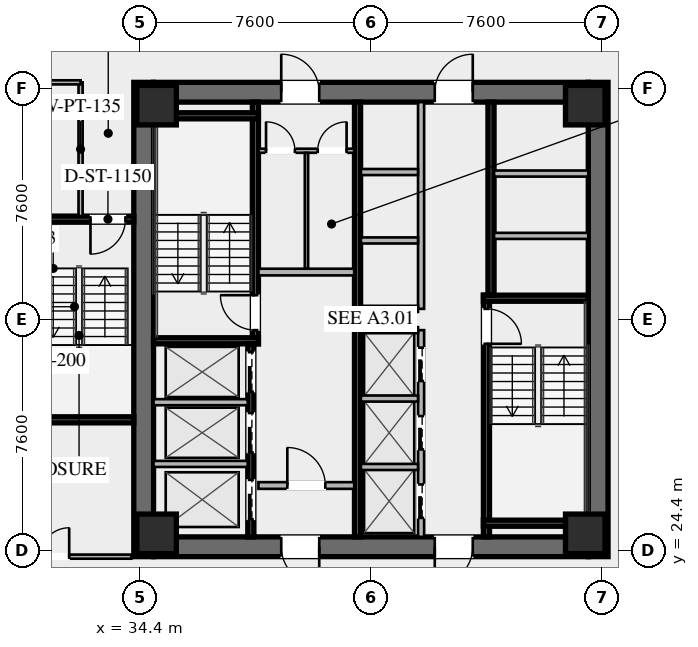
"""IFC4 building model, lengths in metres.
Left out: names, types, materials, properties, quantities, classifications, styles, units other than length and angle.
Written with IfcOpenShell. Run it as: python <this file> out.ifc"""

import sys

from ifc_helpers import new_model, si_unit, direction, frame, frame_2d, origin, origin_2d, place, context, subcontext, project, spatial, rectangle, hollow_rectangle, extrude, element, fill, save


model = new_model("IFC4")
c1 = context("Model", 3, precision=1e-05, world=origin(), true_north=direction((0.0, 1.0)))
c2 = subcontext(c1, "Body", "Model", "MODEL_VIEW")
j1 = project(units=[si_unit("LENGTHUNIT", "METRE"), si_unit("PLANEANGLEUNIT", "RADIAN")], contexts=[c1])
p1 = place(None, origin())
s1 = spatial("IfcSite", under=j1, at=p1, CompositionType="ELEMENT")
p2 = place(p1, origin())
s2 = spatial("IfcBuilding", under=s1, at=p2, CompositionType="ELEMENT")
p3 = place(p2, frame((0.0, 0.0, 24.6)))
s3 = spatial("IfcBuildingStorey", under=s2, at=p3, CompositionType="ELEMENT", Elevation=24.6)
for number, where, z_axis, x_axis in (
    (1, (34.525, 24.2, 0.0), (0.0, 0.0, 1.0), (0.0, 1.0, 0.0)),
    (2, (49.475, 39.8, 0.0), (0.0, 0.0, 1.0), (0.0, -1.0, 0.0)),
):
    element("IfcWall", number, at=place(p3, frame(where, z_axis=z_axis, x_axis=x_axis)), inside=s3, PredefinedType="SHEAR", context=c2, shape_type="SweptSolid", body=[
        extrude(rectangle(XDim=15.6, YDim=0.65, at=frame_2d((7.8, 0.0))), origin(), (0.0, 0.0, 1.0), 3.55),
    ])
p4 = place(p3, frame((49.15, 24.525, 0.0), z_axis=(0.0, 0.0, 1.0), x_axis=(-1.0, 0.0, 0.0)))
e3 = element("IfcWall", 3, at=p4, inside=s3, PredefinedType="SHEAR", context=c2, shape_type="SweptSolid", body=[
    extrude(rectangle(XDim=14.3, YDim=0.65, at=frame_2d((7.15, 0.0))), origin(), (0.0, 0.0, 1.0), 3.55),
])
p5 = place(p4, frame((8.85, 0.0, 0.0)))
e4 = element("IfcOpeningElement", 4, at=p5, cuts=e3, PredefinedType="OPENING", context=c2, shape_type="SweptSolid", body=[
    extrude(rectangle(XDim=1.25, YDim=2.25, at=frame_2d((0.625, 1.125))), frame((0.0, 0.335, 0.0), z_axis=(0.0, -1.0, 0.0), x_axis=(1.0, 0.0, 0.0)), (0.0, 0.0, 1.0), 0.67),
])
p6 = place(p4, frame((3.8, 0.0, 0.0)))
e5 = element("IfcOpeningElement", 5, at=p6, cuts=e3, PredefinedType="OPENING", context=c2, shape_type="SweptSolid", body=[
    extrude(rectangle(XDim=1.25, YDim=2.25, at=frame_2d((0.625, 1.125))), frame((0.0, 0.335, 0.0), z_axis=(0.0, -1.0, 0.0), x_axis=(1.0, 0.0, 0.0)), (0.0, 0.0, 1.0), 0.67),
])
p7 = place(p3, frame((34.85, 39.475, 0.0), z_axis=(0.0, 0.0, 1.0), x_axis=(1.0, 0.0, 0.0)))
e6 = element("IfcWall", 6, at=p7, inside=s3, PredefinedType="SHEAR", context=c2, shape_type="SweptSolid", body=[
    extrude(rectangle(XDim=14.3, YDim=0.65, at=frame_2d((7.15, 0.0))), origin(), (0.0, 0.0, 1.0), 3.55),
])
p8 = place(p7, frame((4.2, 0.0, 0.0)))
e7 = element("IfcOpeningElement", 7, at=p8, cuts=e6, PredefinedType="OPENING", context=c2, shape_type="SweptSolid", body=[
    extrude(rectangle(XDim=1.25, YDim=2.25, at=frame_2d((0.625, 1.125))), frame((0.0, 0.335, 0.0), z_axis=(0.0, -1.0, 0.0), x_axis=(1.0, 0.0, 0.0)), (0.0, 0.0, 1.0), 0.67),
])
p9 = place(p7, frame((9.25, 0.0, 0.0)))
e8 = element("IfcOpeningElement", 8, at=p9, cuts=e6, PredefinedType="OPENING", context=c2, shape_type="SweptSolid", body=[
    extrude(rectangle(XDim=1.25, YDim=2.25, at=frame_2d((0.625, 1.125))), frame((0.0, 0.335, 0.0), z_axis=(0.0, -1.0, 0.0), x_axis=(1.0, 0.0, 0.0)), (0.0, 0.0, 1.0), 0.67),
])
for number, where, z_axis, x_axis in (
    (9, (34.95, 24.95, 0.0), (0.0, 0.0, 1.0), (1.0, 0.0, 0.0)),
    (10, (49.05, 24.95, 0.0), (0.0, 0.0, 1.0), (1.0, 0.0, 0.0)),
    (11, (49.05, 39.05, 0.0), (0.0, 0.0, 1.0), (1.0, 0.0, 0.0)),
    (12, (34.95, 39.05, 0.0), (0.0, 0.0, 1.0), (1.0, 0.0, 0.0)),
):
    element("IfcColumn", number, at=place(p3, frame(where, z_axis=z_axis, x_axis=x_axis)), inside=s3, PredefinedType="COLUMN", context=c2, shape_type="SweptSolid", body=[
        extrude(hollow_rectangle(XDim=1.3, YDim=1.3, WallThickness=0.05, at=origin_2d()), origin(), (0.0, 0.0, 1.0), 3.35),
    ])
p10 = place(p3, frame((38.2, 31.2, 0.0), z_axis=(0.0, 0.0, 1.0), x_axis=(0.0, 1.0, 0.0)))
e13 = element("IfcWall", 13, at=p10, inside=s3, PredefinedType="SHEAR", context=c2, shape_type="SweptSolid", body=[
    extrude(rectangle(XDim=7.95, YDim=0.2, at=frame_2d((3.975, 0.0))), origin(), (0.0, 0.0, 1.0), 3.35),
])
p11 = place(p10, frame((0.45, 0.0, 0.0)))
e14 = element("IfcOpeningElement", 14, at=p11, cuts=e13, PredefinedType="OPENING", context=c2, shape_type="SweptSolid", body=[
    extrude(rectangle(XDim=1.15, YDim=2.2, at=frame_2d((0.575, 1.1))), frame((0.0, 0.11, 0.0), z_axis=(0.0, -1.0, 0.0), x_axis=(1.0, 0.0, 0.0)), (0.0, 0.0, 1.0), 0.22),
])
for number, where, z_axis, x_axis in (
    (15, (34.85, 31.3, 0.0), (0.0, 0.0, 1.0), (1.0, 0.0, 0.0)),
    (16, (34.85, 38.7, 0.0), (0.0, 0.0, 1.0), (1.0, 0.0, 0.0)),
):
    element("IfcWall", number, at=place(p3, frame(where, z_axis=z_axis, x_axis=x_axis)), inside=s3, PredefinedType="SHEAR", context=c2, shape_type="SweptSolid", body=[
        extrude(rectangle(XDim=3.45, YDim=0.2, at=frame_2d((1.725, 0.0))), origin(), (0.0, 0.0, 1.0), 3.35),
    ])
p12 = place(p3, frame((45.8, 32.8, 0.0), z_axis=(0.0, 0.0, 1.0), x_axis=(0.0, -1.0, 0.0)))
e17 = element("IfcWall", 17, at=p12, inside=s3, PredefinedType="SHEAR", context=c2, shape_type="SweptSolid", body=[
    extrude(rectangle(XDim=7.95, YDim=0.2, at=frame_2d((3.975, 0.0))), origin(), (0.0, 0.0, 1.0), 3.35),
])
p13 = place(p12, frame((0.45, 0.0, 0.0)))
e18 = element("IfcOpeningElement", 18, at=p13, cuts=e17, PredefinedType="OPENING", context=c2, shape_type="SweptSolid", body=[
    extrude(rectangle(XDim=1.15, YDim=2.2, at=frame_2d((0.575, 1.1))), frame((0.0, 0.11, 0.0), z_axis=(0.0, -1.0, 0.0), x_axis=(1.0, 0.0, 0.0)), (0.0, 0.0, 1.0), 0.22),
])
for number, where, z_axis, x_axis in (
    (19, (45.7, 32.7, 0.0), (0.0, 0.0, 1.0), (1.0, 0.0, 0.0)),
    (20, (45.7, 25.3, 0.0), (0.0, 0.0, 1.0), (1.0, 0.0, 0.0)),
):
    element("IfcWall", number, at=place(p3, frame(where, z_axis=z_axis, x_axis=x_axis)), inside=s3, PredefinedType="SHEAR", context=c2, shape_type="SweptSolid", body=[
        extrude(rectangle(XDim=3.45, YDim=0.2, at=frame_2d((1.725, 0.0))), origin(), (0.0, 0.0, 1.0), 3.35),
    ])
p14 = place(p3, frame((41.56, 24.85, 0.0), z_axis=(0.0, 0.0, 1.0), x_axis=(0.0, 1.0, 0.0)))
e21 = element("IfcWall", 21, at=p14, inside=s3, PredefinedType="SHEAR", context=c2, shape_type="SweptSolid", body=[
    extrude(rectangle(XDim=14.3, YDim=0.2, at=frame_2d((7.15, 0.0))), origin(), (0.0, 0.0, 1.0), 3.35),
])
p15 = place(p3, frame((38.3, 33.56, 0.0), z_axis=(0.0, 0.0, 1.0), x_axis=(1.0, 0.0, 0.0)))
e22 = element("IfcWall", 22, at=p15, inside=s3, PredefinedType="SOLIDWALL", context=c2, shape_type="SweptSolid", body=[
    extrude(rectangle(XDim=3.15, YDim=0.22, at=frame_2d((1.575, 0.0))), origin(), (0.0, 0.0, 1.0), 2.703),
])
p16 = place(p3, frame((38.3, 26.54, 0.0), z_axis=(0.0, 0.0, 1.0), x_axis=(1.0, 0.0, 0.0)))
e23 = element("IfcWall", 23, at=p16, inside=s3, PredefinedType="SOLIDWALL", context=c2, shape_type="SweptSolid", body=[
    extrude(rectangle(XDim=3.15, YDim=0.22, at=frame_2d((1.575, 0.0))), origin(), (0.0, 0.0, 1.0), 2.703),
])
p17 = place(p16, frame((0.95, 0.0, 0.0)))
e24 = element("IfcOpeningElement", 24, at=p17, cuts=e23, PredefinedType="OPENING", context=c2, shape_type="SweptSolid", body=[
    extrude(rectangle(XDim=1.25, YDim=2.25, at=frame_2d((0.625, 1.125))), frame((0.0, 0.12, 0.0), z_axis=(0.0, -1.0, 0.0), x_axis=(1.0, 0.0, 0.0)), (0.0, 0.0, 1.0), 0.24),
])
p18 = place(p3, frame((38.05, 24.85, 0.0), z_axis=(0.0, 0.0, 1.0), x_axis=(0.0, 1.0, 0.0)))
e25 = element("IfcWall", 25, at=p18, inside=s3, PredefinedType="SHEAR", context=c2, shape_type="SweptSolid", body=[
    extrude(rectangle(XDim=6.35, YDim=0.2, at=frame_2d((3.175, 0.0))), origin(), (0.0, 0.0, 1.0), 3.35),
])
p19 = place(p18, frame((4.775, 0.0, 0.0)))
e26 = element("IfcOpeningElement", 26, at=p19, cuts=e25, PredefinedType="OPENING", context=c2, shape_type="SweptSolid", body=[
    extrude(rectangle(XDim=1.3, YDim=2.25, at=frame_2d((0.65, 1.125))), frame((0.0, 0.11, 0.0), z_axis=(0.0, -1.0, 0.0), x_axis=(1.0, 0.0, 0.0)), (0.0, 0.0, 1.0), 0.22),
])
p20 = place(p18, frame((2.775, 0.0, 0.0)))
e27 = element("IfcOpeningElement", 27, at=p20, cuts=e25, PredefinedType="OPENING", context=c2, shape_type="SweptSolid", body=[
    extrude(rectangle(XDim=1.3, YDim=2.25, at=frame_2d((0.65, 1.125))), frame((0.0, 0.11, 0.0), z_axis=(0.0, -1.0, 0.0), x_axis=(1.0, 0.0, 0.0)), (0.0, 0.0, 1.0), 0.22),
])
p21 = place(p18, frame((0.575, 0.0, 0.0)))
e28 = element("IfcOpeningElement", 28, at=p21, cuts=e25, PredefinedType="OPENING", context=c2, shape_type="SweptSolid", body=[
    extrude(rectangle(XDim=1.3, YDim=2.25, at=frame_2d((0.65, 1.125))), frame((0.0, 0.11, 0.0), z_axis=(0.0, -1.0, 0.0), x_axis=(1.0, 0.0, 0.0)), (0.0, 0.0, 1.0), 0.22),
])
for number, where, z_axis, x_axis in (
    (29, (34.85, 27.25, 0.0), (0.0, 0.0, 1.0), (1.0, 0.0, 0.0)),
    (30, (34.85, 29.28, 0.0), (0.0, 0.0, 1.0), (1.0, 0.0, 0.0)),
):
    element("IfcWall", number, at=place(p3, frame(where, z_axis=z_axis, x_axis=x_axis)), inside=s3, PredefinedType="SOLIDWALL", context=c2, shape_type="SweptSolid", body=[
        extrude(rectangle(XDim=3.1, YDim=0.2, at=frame_2d((1.55, 0.0))), origin(), (0.0, 0.0, 1.0), 3.35),
    ])
p22 = place(p3, frame((45.95, 39.15, 0.0), z_axis=(0.0, 0.0, 1.0), x_axis=(0.0, -1.0, 0.0)))
e31 = element("IfcWall", 31, at=p22, inside=s3, PredefinedType="SHEAR", context=c2, shape_type="SweptSolid", body=[
    extrude(rectangle(XDim=6.35, YDim=0.2, at=frame_2d((3.175, 0.0))), origin(), (0.0, 0.0, 1.0), 3.35),
])
for number, where, z_axis, x_axis in (
    (32, (46.05, 34.75, 0.0), (0.0, 0.0, 1.0), (1.0, 0.0, 0.0)),
    (33, (46.05, 36.8, 0.0), (0.0, 0.0, 1.0), (1.0, 0.0, 0.0)),
):
    element("IfcWall", number, at=place(p3, frame(where, z_axis=z_axis, x_axis=x_axis)), inside=s3, PredefinedType="SOLIDWALL", context=c2, shape_type="SweptSolid", body=[
        extrude(rectangle(XDim=3.1, YDim=0.2, at=frame_2d((1.55, 0.0))), origin(), (0.0, 0.0, 1.0), 3.35),
    ])
p23 = place(p3, frame((38.3, 37.55, 0.0), z_axis=(0.0, 0.0, 1.0), x_axis=(1.0, 0.0, 0.0)))
e34 = element("IfcWall", 34, at=p23, inside=s3, PredefinedType="PARTITIONING", context=c2, shape_type="SweptSolid", body=[
    extrude(rectangle(XDim=3.15, YDim=0.135, at=frame_2d((1.575, 0.0))), origin(), (0.0, 0.0, 1.0), 2.703),
])
p24 = place(p23, frame((0.25, 0.0, 0.0)))
e35 = element("IfcOpeningElement", 35, at=p24, cuts=e34, PredefinedType="OPENING", context=c2, shape_type="SweptSolid", body=[
    extrude(rectangle(XDim=0.95, YDim=2.05, at=frame_2d((0.475, 1.025))), frame((0.0, 0.077, 0.0), z_axis=(0.0, -1.0, 0.0), x_axis=(1.0, 0.0, 0.0)), (0.0, 0.0, 1.0), 0.155),
])
p25 = place(p23, frame((1.95, 0.0, 0.0)))
e36 = element("IfcOpeningElement", 36, at=p25, cuts=e34, PredefinedType="OPENING", context=c2, shape_type="SweptSolid", body=[
    extrude(rectangle(XDim=0.95, YDim=2.05, at=frame_2d((0.475, 1.025))), frame((0.0, 0.077, 0.0), z_axis=(0.0, -1.0, 0.0), x_axis=(1.0, 0.0, 0.0)), (0.0, 0.0, 1.0), 0.155),
])
p26 = place(p3, frame((39.88, 33.68, 0.0), z_axis=(0.0, 0.0, 1.0), x_axis=(0.0, 1.0, 0.0)))
e37 = element("IfcWall", 37, at=p26, inside=s3, PredefinedType="PARTITIONING", context=c2, shape_type="SweptSolid", body=[
    extrude(rectangle(XDim=3.8, YDim=0.11, at=frame_2d((1.9, 0.0))), origin(), (0.0, 0.0, 1.0), 2.703),
])
p27 = place(p3, frame((43.65, 24.85, 0.0), z_axis=(0.0, 0.0, 1.0), x_axis=(0.0, 1.0, 0.0)))
e38 = element("IfcWall", 38, at=p27, inside=s3, PredefinedType="SOLIDWALL", context=c2, shape_type="SweptSolid", body=[
    extrude(rectangle(XDim=6.8, YDim=0.2, at=frame_2d((3.4, 0.0))), origin(), (0.0, 0.0, 1.0), 3.35),
])
p28 = place(p27, frame((0.625, 0.0, 0.0)))
e39 = element("IfcOpeningElement", 39, at=p28, cuts=e38, PredefinedType="OPENING", context=c2, shape_type="SweptSolid", body=[
    extrude(rectangle(XDim=1.1, YDim=2.2, at=frame_2d((0.55, 1.1))), frame((0.0, 0.11, 0.0), z_axis=(0.0, -1.0, 0.0), x_axis=(1.0, 0.0, 0.0)), (0.0, 0.0, 1.0), 0.22),
])
p29 = place(p27, frame((2.875, 0.0, 0.0)))
e40 = element("IfcOpeningElement", 40, at=p29, cuts=e38, PredefinedType="OPENING", context=c2, shape_type="SweptSolid", body=[
    extrude(rectangle(XDim=1.1, YDim=2.2, at=frame_2d((0.55, 1.1))), frame((0.0, 0.11, 0.0), z_axis=(0.0, -1.0, 0.0), x_axis=(1.0, 0.0, 0.0)), (0.0, 0.0, 1.0), 0.22),
])
p30 = place(p27, frame((5.125, 0.0, 0.0)))
e41 = element("IfcOpeningElement", 41, at=p30, cuts=e38, PredefinedType="OPENING", context=c2, shape_type="SweptSolid", body=[
    extrude(rectangle(XDim=1.1, YDim=2.2, at=frame_2d((0.55, 1.1))), frame((0.0, 0.11, 0.0), z_axis=(0.0, -1.0, 0.0), x_axis=(1.0, 0.0, 0.0)), (0.0, 0.0, 1.0), 0.22),
])
for number, where, z_axis, x_axis in (
    (42, (41.67, 27.15, 0.0), (0.0, 0.0, 1.0), (1.0, 0.0, 0.0)),
    (43, (41.67, 29.4, 0.0), (0.0, 0.0, 1.0), (1.0, 0.0, 0.0)),
    (44, (41.67, 31.65, 0.0), (0.0, 0.0, 1.0), (1.0, 0.0, 0.0)),
):
    element("IfcWall", number, at=place(p3, frame(where, z_axis=z_axis, x_axis=x_axis)), inside=s3, PredefinedType="SOLIDWALL", context=c2, shape_type="SweptSolid", body=[
        extrude(rectangle(XDim=1.88, YDim=0.2, at=frame_2d((0.94, 0.0))), origin(), (0.0, 0.0, 1.0), 3.35),
    ])
p31 = place(p3, frame((43.65, 32.35, 0.0), z_axis=(0.0, 0.0, 1.0), x_axis=(0.0, 1.0, 0.0)))
e45 = element("IfcWall", 45, at=p31, inside=s3, PredefinedType="SOLIDWALL", context=c2, shape_type="SweptSolid", body=[
    extrude(rectangle(XDim=6.8, YDim=0.2, at=frame_2d((3.4, 0.0))), origin(), (0.0, 0.0, 1.0), 3.35),
])
for number, where, z_axis, x_axis in (
    (46, (41.67, 32.35, 0.0), (0.0, 0.0, 1.0), (1.0, 0.0, 0.0)),
    (47, (41.67, 34.6, 0.0), (0.0, 0.0, 1.0), (1.0, 0.0, 0.0)),
    (48, (41.67, 36.85, 0.0), (0.0, 0.0, 1.0), (1.0, 0.0, 0.0)),
):
    element("IfcWall", number, at=place(p3, frame(where, z_axis=z_axis, x_axis=x_axis)), inside=s3, PredefinedType="SOLIDWALL", context=c2, shape_type="SweptSolid", body=[
        extrude(rectangle(XDim=1.88, YDim=0.2, at=frame_2d((0.94, 0.0))), origin(), (0.0, 0.0, 1.0), 3.35),
    ])
p32 = place(p3, frame((34.2, 35.3, 0.0), z_axis=(0.0, 0.0, 1.0), x_axis=(-1.0, 0.0, 0.0)))
e49 = element("IfcWall", 49, at=p32, inside=s3, PredefinedType="SHEAR", context=c2, shape_type="SweptSolid", body=[
    extrude(rectangle(XDim=3.4, YDim=0.2, at=frame_2d((1.7, 0.0))), origin(), (0.0, 0.0, 1.0), 3.35),
])
p33 = place(p32, frame((0.275, 0.0, 0.0)))
e50 = element("IfcOpeningElement", 50, at=p33, cuts=e49, PredefinedType="OPENING", context=c2, shape_type="SweptSolid", body=[
    extrude(rectangle(XDim=1.15, YDim=2.2, at=frame_2d((0.575, 1.1))), frame((0.0, 0.11, 0.0), z_axis=(0.0, -1.0, 0.0), x_axis=(1.0, 0.0, 0.0)), (0.0, 0.0, 1.0), 0.22),
])
p34 = place(p3, frame((30.8, 28.7, 0.0), z_axis=(0.0, 0.0, 1.0), x_axis=(1.0, 0.0, 0.0)))
e51 = element("IfcWall", 51, at=p34, inside=s3, PredefinedType="SHEAR", context=c2, shape_type="SweptSolid", body=[
    extrude(rectangle(XDim=3.4, YDim=0.2, at=frame_2d((1.7, 0.0))), origin(), (0.0, 0.0, 1.0), 3.35),
])
p35 = place(p3, frame((32.45, 35.4, 0.0), z_axis=(0.0, 0.0, 1.0), x_axis=(0.0, 1.0, 0.0)))
e52 = element("IfcWall", 52, at=p35, inside=s3, PredefinedType="PARTITIONING", context=c2, shape_type="SweptSolid", body=[
    extrude(rectangle(XDim=4.4, YDim=0.135, at=frame_2d((2.2, 0.0))), origin(), (0.0, 0.0, 1.0), 2.703),
])
p36 = place(p3, frame((32.45, 39.8, 0.0), z_axis=(0.0, 0.0, 1.0), x_axis=(-1.0, 0.0, 0.0)))
e53 = element("IfcWall", 53, at=p36, inside=s3, PredefinedType="PARTITIONING", context=c2, shape_type="SweptSolid", body=[
    extrude(rectangle(XDim=13.33, YDim=0.135, at=frame_2d((6.665, 0.0))), origin(), (0.0, 0.0, 1.0), 2.703),
])
p37 = place(p36, frame((5.84, 0.0, 0.0)))
e54 = element("IfcOpeningElement", 54, at=p37, cuts=e53, PredefinedType="OPENING", context=c2, shape_type="SweptSolid", body=[
    extrude(rectangle(XDim=0.95, YDim=2.05, at=frame_2d((0.475, 1.025))), frame((0.0, 0.077, 0.0), z_axis=(0.0, -1.0, 0.0), x_axis=(1.0, 0.0, 0.0)), (0.0, 0.0, 1.0), 0.155),
])
p38 = place(p3, frame((19.12, 24.2, 0.0), z_axis=(0.0, 0.0, 1.0), x_axis=(1.0, 0.0, 0.0)))
e55 = element("IfcWall", 55, at=p38, inside=s3, PredefinedType="PARTITIONING", context=c2, shape_type="SweptSolid", body=[
    extrude(rectangle(XDim=15.0, YDim=0.135, at=frame_2d((7.5, 0.0))), origin(), (0.0, 0.0, 1.0), 2.703),
])
p39 = place(p38, frame((12.005, 0.0, 0.0)))
e56 = element("IfcOpeningElement", 56, at=p39, cuts=e55, PredefinedType="OPENING", context=c2, shape_type="SweptSolid", body=[
    extrude(rectangle(XDim=0.95, YDim=2.05, at=frame_2d((0.475, 1.025))), frame((0.0, 0.077, 0.0), z_axis=(0.0, -1.0, 0.0), x_axis=(1.0, 0.0, 0.0)), (0.0, 0.0, 1.0), 0.155),
])
p40 = place(p8, origin())
e57 = element("IfcDoor", 57, at=p40, inside=s3, OperationType="SINGLE_SWING_LEFT", PredefinedType="DOOR", context=c2, shape_type="SweptSolid", body=[
    extrude(rectangle(XDim=1.25, YDim=2.25, at=frame_2d((0.625, 1.125))), frame((0.0, 0.025, 0.0), z_axis=(0.0, -1.0, 0.0), x_axis=(1.0, 0.0, 0.0)), (0.0, 0.0, 1.0), 0.05),
])
fill(e7, e57)
p41 = place(p9, origin())
e58 = element("IfcDoor", 58, at=p41, inside=s3, OperationType="SINGLE_SWING_RIGHT", PredefinedType="DOOR", context=c2, shape_type="SweptSolid", body=[
    extrude(rectangle(XDim=1.25, YDim=2.25, at=frame_2d((0.625, 1.125))), frame((0.0, 0.025, 0.0), z_axis=(0.0, -1.0, 0.0), x_axis=(1.0, 0.0, 0.0)), (0.0, 0.0, 1.0), 0.05),
])
fill(e8, e58)
p42 = place(p5, origin())
e59 = element("IfcDoor", 59, at=p42, inside=s3, OperationType="SINGLE_SWING_LEFT", PredefinedType="DOOR", context=c2, shape_type="SweptSolid", body=[
    extrude(rectangle(XDim=1.25, YDim=2.25, at=frame_2d((0.625, 1.125))), frame((0.0, 0.025, 0.0), z_axis=(0.0, -1.0, 0.0), x_axis=(1.0, 0.0, 0.0)), (0.0, 0.0, 1.0), 0.05),
])
fill(e4, e59)
p43 = place(p6, origin())
e60 = element("IfcDoor", 60, at=p43, inside=s3, OperationType="SINGLE_SWING_RIGHT", PredefinedType="DOOR", context=c2, shape_type="SweptSolid", body=[
    extrude(rectangle(XDim=1.25, YDim=2.25, at=frame_2d((0.625, 1.125))), frame((0.0, 0.025, 0.0), z_axis=(0.0, -1.0, 0.0), x_axis=(1.0, 0.0, 0.0)), (0.0, 0.0, 1.0), 0.05),
])
fill(e5, e60)
p44 = place(p11, origin())
e61 = element("IfcDoor", 61, at=p44, inside=s3, OperationType="SINGLE_SWING_RIGHT", PredefinedType="DOOR", context=c2, shape_type="SweptSolid", body=[
    extrude(rectangle(XDim=1.15, YDim=2.2, at=frame_2d((0.575, 1.1))), frame((0.0, 0.025, 0.0), z_axis=(0.0, -1.0, 0.0), x_axis=(1.0, 0.0, 0.0)), (0.0, 0.0, 1.0), 0.05),
])
fill(e14, e61)
p45 = place(p13, origin())
e62 = element("IfcDoor", 62, at=p45, inside=s3, OperationType="SINGLE_SWING_RIGHT", PredefinedType="DOOR", context=c2, shape_type="SweptSolid", body=[
    extrude(rectangle(XDim=1.15, YDim=2.2, at=frame_2d((0.575, 1.1))), frame((0.0, 0.025, 0.0), z_axis=(0.0, -1.0, 0.0), x_axis=(1.0, 0.0, 0.0)), (0.0, 0.0, 1.0), 0.05),
])
fill(e18, e62)
p46 = place(p17, origin())
e63 = element("IfcDoor", 63, at=p46, inside=s3, OperationType="SINGLE_SWING_LEFT", PredefinedType="DOOR", context=c2, shape_type="SweptSolid", body=[
    extrude(rectangle(XDim=1.25, YDim=2.25, at=frame_2d((0.625, 1.125))), frame((0.0, 0.025, 0.0), z_axis=(0.0, -1.0, 0.0), x_axis=(1.0, 0.0, 0.0)), (0.0, 0.0, 1.0), 0.05),
])
fill(e24, e63)
p47 = place(p24, origin())
e64 = element("IfcDoor", 64, at=p47, inside=s3, OperationType="SINGLE_SWING_LEFT", PredefinedType="DOOR", context=c2, shape_type="SweptSolid", body=[
    extrude(rectangle(XDim=0.95, YDim=2.05, at=frame_2d((0.475, 1.025))), frame((0.0, 0.025, 0.0), z_axis=(0.0, -1.0, 0.0), x_axis=(1.0, 0.0, 0.0)), (0.0, 0.0, 1.0), 0.05),
])
fill(e35, e64)
p48 = place(p25, origin())
e65 = element("IfcDoor", 65, at=p48, inside=s3, OperationType="SINGLE_SWING_RIGHT", PredefinedType="DOOR", context=c2, shape_type="SweptSolid", body=[
    extrude(rectangle(XDim=0.95, YDim=2.05, at=frame_2d((0.475, 1.025))), frame((0.0, 0.025, 0.0), z_axis=(0.0, -1.0, 0.0), x_axis=(1.0, 0.0, 0.0)), (0.0, 0.0, 1.0), 0.05),
])
fill(e36, e65)
p49 = place(p33, origin())
e66 = element("IfcDoor", 66, at=p49, inside=s3, OperationType="SINGLE_SWING_RIGHT", PredefinedType="DOOR", context=c2, shape_type="SweptSolid", body=[
    extrude(rectangle(XDim=1.15, YDim=2.2, at=frame_2d((0.575, 1.1))), frame((0.0, 0.025, 0.0), z_axis=(0.0, -1.0, 0.0), x_axis=(1.0, 0.0, 0.0)), (0.0, 0.0, 1.0), 0.05),
])
fill(e50, e66)
p50 = place(p39, origin())
e67 = element("IfcDoor", 67, at=p50, inside=s3, OperationType="SINGLE_SWING_RIGHT", PredefinedType="DOOR", context=c2, shape_type="SweptSolid", body=[
    extrude(rectangle(XDim=0.95, YDim=2.05, at=frame_2d((0.475, 1.025))), frame((0.0, 0.025, 0.0), z_axis=(0.0, -1.0, 0.0), x_axis=(1.0, 0.0, 0.0)), (0.0, 0.0, 1.0), 0.05),
])
fill(e56, e67)
p51 = place(p19, origin())
e68 = element("IfcDoor", 68, at=p51, inside=s3, OperationType="SLIDING_TO_LEFT", PredefinedType="DOOR", context=c2, shape_type="SweptSolid", body=[
    extrude(rectangle(XDim=1.3, YDim=2.25, at=frame_2d((0.65, 1.125))), frame((0.0, 0.025, 0.0), z_axis=(0.0, -1.0, 0.0), x_axis=(1.0, 0.0, 0.0)), (0.0, 0.0, 1.0), 0.05),
])
fill(e26, e68)
p52 = place(p20, origin())
e69 = element("IfcDoor", 69, at=p52, inside=s3, OperationType="SLIDING_TO_LEFT", PredefinedType="DOOR", context=c2, shape_type="SweptSolid", body=[
    extrude(rectangle(XDim=1.3, YDim=2.25, at=frame_2d((0.65, 1.125))), frame((0.0, 0.025, 0.0), z_axis=(0.0, -1.0, 0.0), x_axis=(1.0, 0.0, 0.0)), (0.0, 0.0, 1.0), 0.05),
])
fill(e27, e69)
p53 = place(p21, origin())
e70 = element("IfcDoor", 70, at=p53, inside=s3, OperationType="SLIDING_TO_LEFT", PredefinedType="DOOR", context=c2, shape_type="SweptSolid", body=[
    extrude(rectangle(XDim=1.3, YDim=2.25, at=frame_2d((0.65, 1.125))), frame((0.0, 0.025, 0.0), z_axis=(0.0, -1.0, 0.0), x_axis=(1.0, 0.0, 0.0)), (0.0, 0.0, 1.0), 0.05),
])
fill(e28, e70)
p54 = place(p28, origin())
e71 = element("IfcDoor", 71, at=p54, inside=s3, OperationType="SLIDING_TO_LEFT", PredefinedType="DOOR", context=c2, shape_type="SweptSolid", body=[
    extrude(rectangle(XDim=1.1, YDim=2.2, at=frame_2d((0.55, 1.1))), frame((0.0, 0.025, 0.0), z_axis=(0.0, -1.0, 0.0), x_axis=(1.0, 0.0, 0.0)), (0.0, 0.0, 1.0), 0.05),
])
fill(e39, e71)
p55 = place(p29, origin())
e72 = element("IfcDoor", 72, at=p55, inside=s3, OperationType="SLIDING_TO_LEFT", PredefinedType="DOOR", context=c2, shape_type="SweptSolid", body=[
    extrude(rectangle(XDim=1.1, YDim=2.2, at=frame_2d((0.55, 1.1))), frame((0.0, 0.025, 0.0), z_axis=(0.0, -1.0, 0.0), x_axis=(1.0, 0.0, 0.0)), (0.0, 0.0, 1.0), 0.05),
])
fill(e40, e72)
p56 = place(p30, origin())
e73 = element("IfcDoor", 73, at=p56, inside=s3, OperationType="SLIDING_TO_LEFT", PredefinedType="DOOR", context=c2, shape_type="SweptSolid", body=[
    extrude(rectangle(XDim=1.1, YDim=2.2, at=frame_2d((0.55, 1.1))), frame((0.0, 0.025, 0.0), z_axis=(0.0, -1.0, 0.0), x_axis=(1.0, 0.0, 0.0)), (0.0, 0.0, 1.0), 0.05),
])
fill(e41, e73)
save(model, sys.argv[1])
